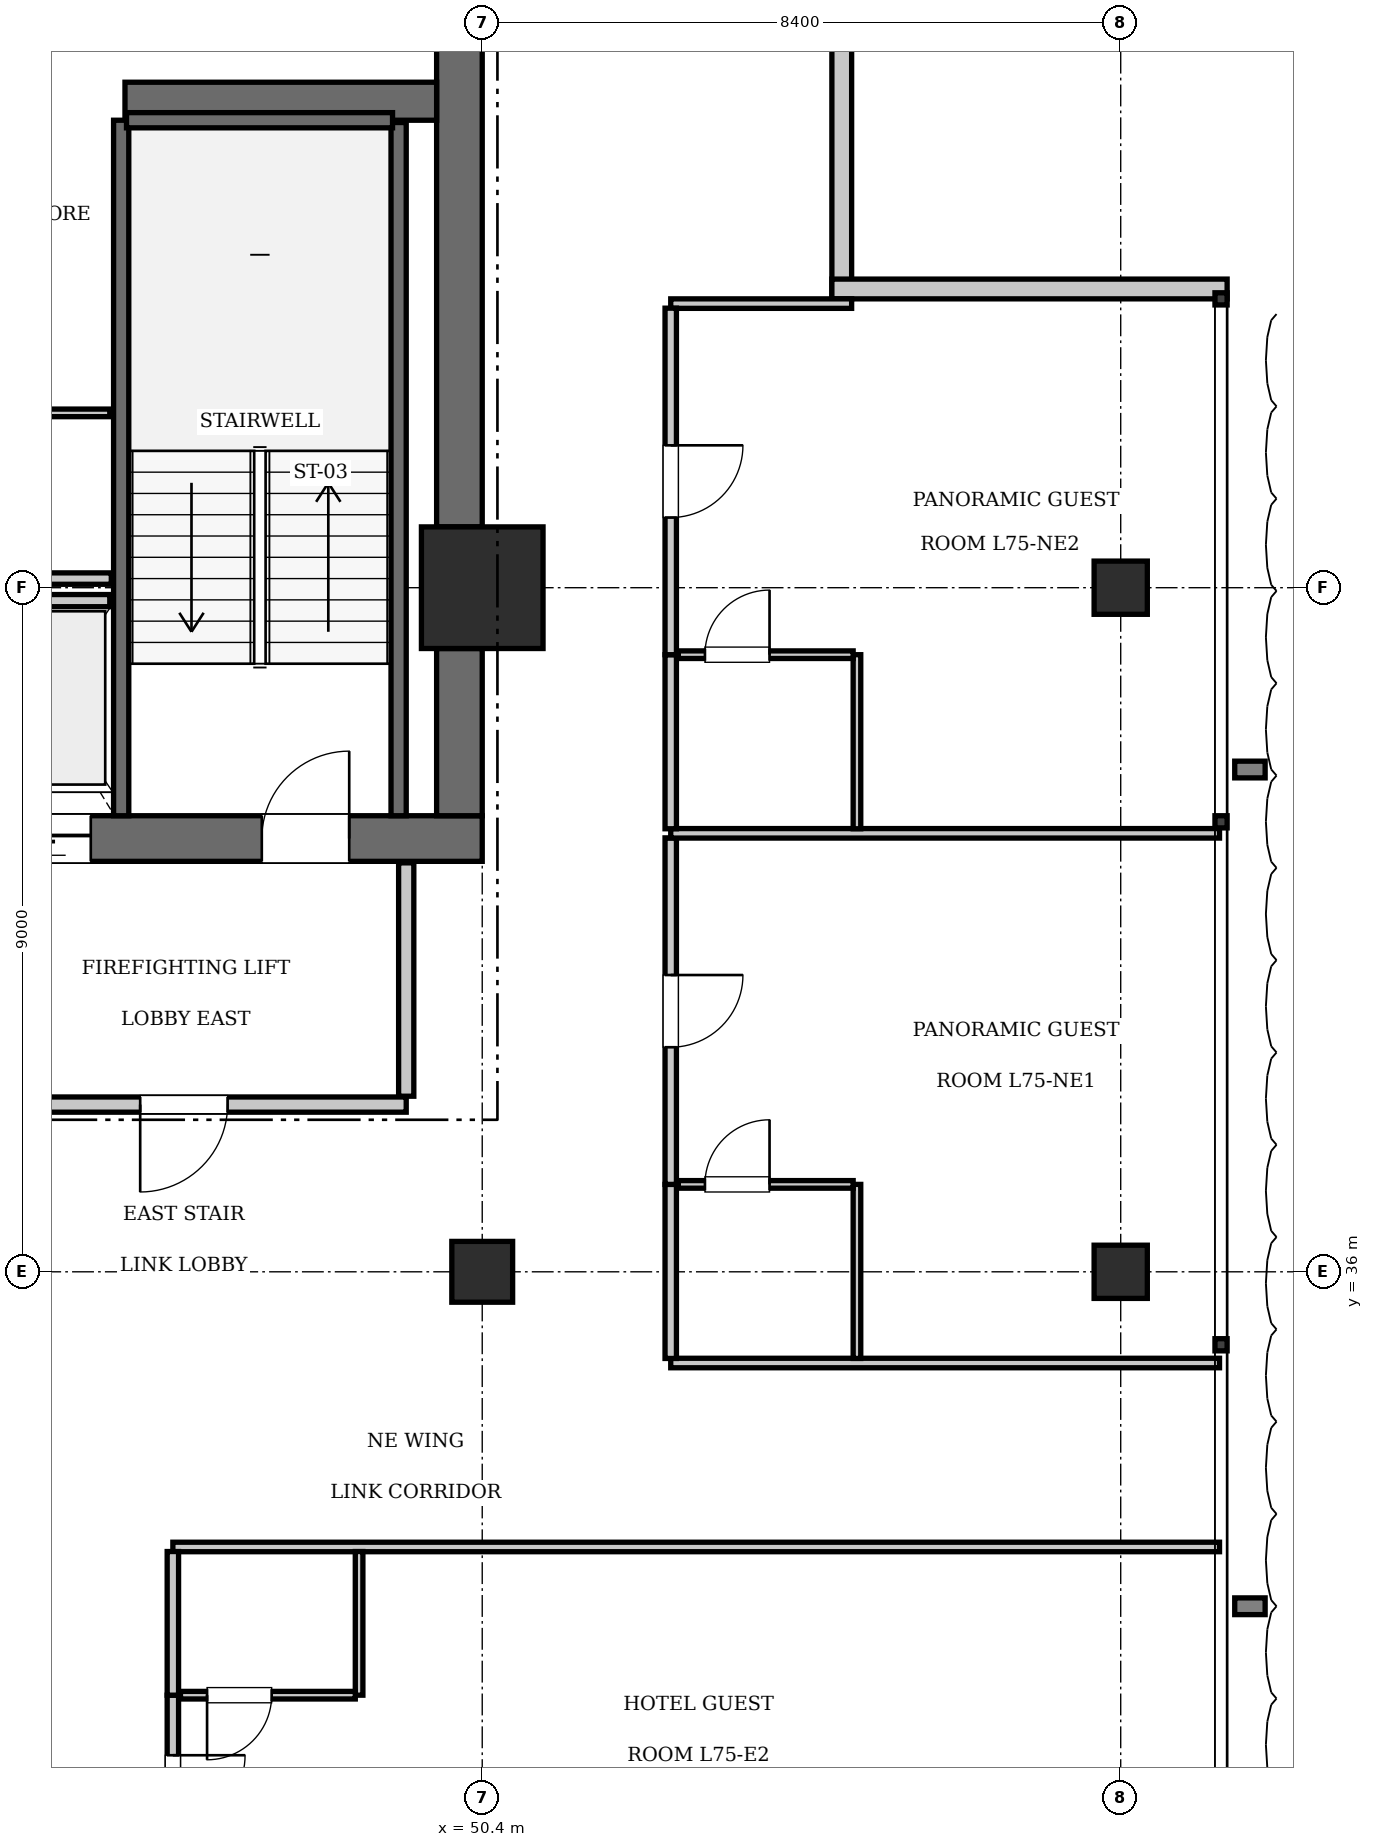
"""IFC4 building model, lengths in metres.
Left out: names, types, materials, properties, quantities, classifications, styles, units other than length and angle.
Written with IfcOpenShell. Run it as: python <this file> out.ifc"""

import sys

from ifc_helpers import new_model, si_unit, direction, frame, frame_2d, origin, origin_2d, place, context, subcontext, project, spatial, rectangle, extrude, element, fill, save


model = new_model("IFC4")
c1 = context("Model", 3, precision=1e-05, world=origin(), true_north=direction((0.0, 1.0)))
c2 = subcontext(c1, "Body", "Model", "MODEL_VIEW")
j1 = project(units=[si_unit("LENGTHUNIT", "METRE"), si_unit("PLANEANGLEUNIT", "RADIAN")], contexts=[c1])
p1 = place(None, origin())
s1 = spatial("IfcSite", under=j1, at=p1, CompositionType="ELEMENT")
p2 = place(p1, origin())
s2 = spatial("IfcBuilding", under=s1, at=p2, CompositionType="ELEMENT")
p3 = place(p2, frame((0.0, 0.0, 304.85)))
s3 = spatial("IfcBuildingStorey", under=s2, at=p3, CompositionType="ELEMENT", Elevation=304.85)
p4 = place(p3, frame((50.4, 45.0, 0.0), z_axis=(0.0, 0.0, 1.0), x_axis=(1.0, 0.0, 0.0)))
e1 = element("IfcColumn", 1, at=p4, inside=s3, PredefinedType="COLUMN", context=c2, shape_type="SweptSolid", body=[
    extrude(rectangle(XDim=1.6, YDim=1.6, at=origin_2d()), origin(), (0.0, 0.0, 1.0), 3.85),
])
p5 = place(p3, frame((43.6, 41.7, 0.0), z_axis=(0.0, 0.0, 1.0), x_axis=(1.0, 0.0, 0.0)))
e2 = element("IfcWall", 2, at=p5, inside=s3, PredefinedType="SHEAR", context=c2, shape_type="SweptSolid", body=[
    extrude(rectangle(XDim=6.8, YDim=0.6, at=frame_2d((3.4, 0.0))), origin(), (0.0, 0.0, 1.0), 3.85),
])
p6 = place(p5, frame((3.9, 0.0, 0.0)))
e3 = element("IfcOpeningElement", 3, at=p6, cuts=e2, PredefinedType="OPENING", context=c2, shape_type="SweptSolid", body=[
    extrude(rectangle(XDim=1.15, YDim=2.15, at=frame_2d((0.575, 1.075))), frame((0.0, 0.31, 0.0), z_axis=(0.0, -1.0, 0.0), x_axis=(1.0, 0.0, 0.0)), (0.0, 0.0, 1.0), 0.62),
])
p7 = place(p5, frame((0.55, 0.0, 0.0)))
e4 = element("IfcOpeningElement", 4, at=p7, cuts=e2, PredefinedType="OPENING", context=c2, shape_type="SweptSolid", body=[
    extrude(rectangle(XDim=1.1, YDim=2.2, at=frame_2d((0.55, 1.1))), frame((0.0, 0.31, 0.0), z_axis=(0.0, -1.0, 0.0), x_axis=(1.0, 0.0, 0.0)), (0.0, 0.0, 1.0), 0.62),
])
p8 = place(p3, frame((50.1, 42.0, 0.0), z_axis=(0.0, 0.0, 1.0), x_axis=(0.0, 1.0, 0.0)))
e5 = element("IfcWall", 5, at=p8, inside=s3, PredefinedType="SHEAR", context=c2, shape_type="SweptSolid", body=[
    extrude(rectangle(XDim=2.2, YDim=0.6, at=frame_2d((1.1, 0.0))), origin(), (0.0, 0.0, 1.0), 3.85),
])
p9 = place(p3, frame((50.1, 45.8, 0.0), z_axis=(0.0, 0.0, 1.0), x_axis=(0.0, 1.0, 0.0)))
e6 = element("IfcWall", 6, at=p9, inside=s3, PredefinedType="SHEAR", context=c2, shape_type="SweptSolid", body=[
    extrude(rectangle(XDim=7.6, YDim=0.6, at=frame_2d((3.8, 0.0))), origin(), (0.0, 0.0, 1.0), 3.85),
])
p10 = place(p3, frame((45.7, 51.4, 0.0), z_axis=(0.0, 0.0, 1.0), x_axis=(1.0, 0.0, 0.0)))
e7 = element("IfcWall", 7, at=p10, inside=s3, PredefinedType="SHEAR", context=c2, shape_type="SweptSolid", body=[
    extrude(rectangle(XDim=4.1, YDim=0.5, at=frame_2d((2.05, 0.0))), origin(), (0.0, 0.0, 1.0), 3.85),
])
p11 = place(p3, frame((50.4, 36.0, 0.0), z_axis=(0.0, 0.0, 1.0), x_axis=(1.0, 0.0, 0.0)))
e8 = element("IfcColumn", 8, at=p11, inside=s3, PredefinedType="COLUMN", context=c2, shape_type="SweptSolid", body=[
    extrude(rectangle(XDim=0.8, YDim=0.8, at=origin_2d()), origin(), (0.0, 0.0, 1.0), 3.85),
])
for number, where, z_axis, x_axis in (
    (9, (58.8, 36.0, 0.0), (0.0, 0.0, 1.0), (1.0, 0.0, 0.0)),
    (10, (58.8, 45.0, 0.0), (0.0, 0.0, 1.0), (1.0, 0.0, 0.0)),
):
    element("IfcColumn", number, at=place(p3, frame(where, z_axis=z_axis, x_axis=x_axis)), inside=s3, PredefinedType="COLUMN", context=c2, shape_type="SweptSolid", body=[
        extrude(rectangle(XDim=0.7, YDim=0.7, at=origin_2d()), origin(), (0.0, 0.0, 1.0), 3.85),
    ])
p12 = place(p3, frame((45.65, 42.0, 0.0), z_axis=(0.0, 0.0, 1.0), x_axis=(0.0, 1.0, 0.0)))
e11 = element("IfcWall", 11, at=p12, inside=s3, PredefinedType="SOLIDWALL", context=c2, shape_type="SweptSolid", body=[
    extrude(rectangle(XDim=9.15, YDim=0.2, at=frame_2d((4.575, 0.0))), origin(), (0.0, 0.0, 1.0), 3.61),
])
p13 = place(p3, frame((49.3, 42.0, 0.0), z_axis=(0.0, 0.0, 1.0), x_axis=(0.0, 1.0, 0.0)))
e12 = element("IfcWall", 12, at=p13, inside=s3, PredefinedType="SOLIDWALL", context=c2, shape_type="SweptSolid", body=[
    extrude(rectangle(XDim=9.12, YDim=0.2, at=frame_2d((4.56, 0.0))), origin(), (0.0, 0.0, 1.0), 3.61),
])
p14 = place(p3, frame((45.72, 51.15, 0.0), z_axis=(0.0, 0.0, 1.0), x_axis=(1.0, 0.0, 0.0)))
e13 = element("IfcWall", 13, at=p14, inside=s3, PredefinedType="SOLIDWALL", context=c2, shape_type="SweptSolid", body=[
    extrude(rectangle(XDim=3.5, YDim=0.2, at=frame_2d((1.75, 0.0))), origin(), (0.0, 0.0, 1.0), 3.61),
])
p15 = place(p3, frame((43.9, 44.83, 0.0), z_axis=(0.0, 0.0, 1.0), x_axis=(1.0, 0.0, 0.0)))
e14 = element("IfcWall", 14, at=p15, inside=s3, PredefinedType="SOLIDWALL", context=c2, shape_type="SweptSolid", body=[
    extrude(rectangle(XDim=1.6, YDim=0.16, at=frame_2d((0.8, 0.0))), origin(), (0.0, 0.0, 1.0), 3.61),
])
for number, where, z_axis, x_axis in (
    (15, (55.13, 54.0, 0.0), (0.0, 0.0, 1.0), (0.0, -1.0, 0.0)),
    (16, (55.0, 48.93, 0.0), (0.0, 0.0, 1.0), (1.0, 0.0, 0.0)),
):
    element("IfcWall", number, at=place(p3, frame(where, z_axis=z_axis, x_axis=x_axis)), inside=s3, PredefinedType="SOLIDWALL", context=c2, shape_type="SweptSolid", body=[
        extrude(rectangle(XDim=5.2, YDim=0.26, at=frame_2d((2.6, 0.0))), origin(), (0.0, 0.0, 1.0), 3.61),
    ])
p16 = place(p3, frame((43.6, 38.2, 0.0), z_axis=(0.0, 0.0, 1.0), x_axis=(1.0, 0.0, 0.0)))
e17 = element("IfcWall", 17, at=p16, inside=s3, PredefinedType="PARTITIONING", context=c2, shape_type="SweptSolid", body=[
    extrude(rectangle(XDim=5.8, YDim=0.2, at=frame_2d((2.9, 0.0))), origin(), (0.0, 0.0, 1.0), 3.61),
])
p17 = place(p16, frame((2.3, 0.0, 0.0)))
e18 = element("IfcOpeningElement", 18, at=p17, cuts=e17, PredefinedType="OPENING", context=c2, shape_type="SweptSolid", body=[
    extrude(rectangle(XDim=1.15, YDim=2.15, at=frame_2d((0.575, 1.075))), frame((0.0, 0.11, 0.0), z_axis=(0.0, -1.0, 0.0), x_axis=(1.0, 0.0, 0.0)), (0.0, 0.0, 1.0), 0.22),
])
p18 = place(p3, frame((49.4, 38.31, 0.0), z_axis=(0.0, 0.0, 1.0), x_axis=(0.0, 1.0, 0.0)))
e19 = element("IfcWall", 19, at=p18, inside=s3, PredefinedType="PARTITIONING", context=c2, shape_type="SweptSolid", body=[
    extrude(rectangle(XDim=3.07, YDim=0.2, at=frame_2d((1.535, 0.0))), origin(), (0.0, 0.0, 1.0), 3.61),
])
p19 = place(p3, frame((42.4, 47.3, 0.0), z_axis=(0.0, 0.0, 1.0), x_axis=(1.0, 0.0, 0.0)))
e20 = element("IfcWall", 20, at=p19, inside=s3, PredefinedType="PARTITIONING", context=c2, shape_type="SweptSolid", body=[
    extrude(rectangle(XDim=3.1, YDim=0.1, at=frame_2d((1.55, 0.0))), origin(), (0.0, 0.0, 1.0), 3.61),
])
p20 = place(p3, frame((42.38, 45.12, 0.0), z_axis=(0.0, 0.0, 1.0), x_axis=(1.0, 0.0, 0.0)))
e21 = element("IfcWall", 21, at=p20, inside=s3, PredefinedType="PARTITIONING", context=c2, shape_type="SweptSolid", body=[
    extrude(rectangle(XDim=3.14, YDim=0.15, at=frame_2d((1.57, 0.0))), origin(), (0.0, 0.0, 1.0), 3.61),
])
p21 = place(p3, frame((46.33, 32.38, 0.0), z_axis=(0.0, 0.0, 1.0), x_axis=(1.0, 0.0, 0.0)))
e22 = element("IfcWall", 22, at=p21, inside=s3, PredefinedType="PARTITIONING", context=c2, shape_type="SweptSolid", body=[
    extrude(rectangle(XDim=13.77, YDim=0.125, at=frame_2d((6.885, 0.0))), origin(), (0.0, 0.0, 1.0), 3.61),
])
p22 = place(p3, frame((46.33, 27.9, 0.0), z_axis=(0.0, 0.0, 1.0), x_axis=(0.0, 1.0, 0.0)))
e23 = element("IfcWall", 23, at=p22, inside=s3, PredefinedType="PARTITIONING", context=c2, shape_type="SweptSolid", body=[
    extrude(rectangle(XDim=2.53, YDim=0.15, at=frame_2d((1.265, 0.0))), origin(), (0.0, 0.0, 1.0), 3.61),
])
p23 = place(p22, frame((0.79, 0.0, 0.0)))
e24 = element("IfcOpeningElement", 24, at=p23, cuts=e23, PredefinedType="OPENING", context=c2, shape_type="SweptSolid", body=[
    extrude(rectangle(XDim=0.95, YDim=2.15, at=frame_2d((0.475, 1.075))), frame((0.0, 0.085, 0.0), z_axis=(0.0, -1.0, 0.0), x_axis=(1.0, 0.0, 0.0)), (0.0, 0.0, 1.0), 0.17),
])
p24 = place(p3, frame((46.33, 30.43, 0.0), z_axis=(0.0, 0.0, 1.0), x_axis=(0.0, 1.0, 0.0)))
e25 = element("IfcWall", 25, at=p24, inside=s3, PredefinedType="PARTITIONING", context=c2, shape_type="SweptSolid", body=[
    extrude(rectangle(XDim=1.89, YDim=0.15, at=frame_2d((0.945, 0.0))), origin(), (0.0, 0.0, 1.0), 3.61),
])
p25 = place(p3, frame((48.78, 30.43, 0.0), z_axis=(0.0, 0.0, 1.0), x_axis=(0.0, 1.0, 0.0)))
e26 = element("IfcWall", 26, at=p25, inside=s3, PredefinedType="PARTITIONING", context=c2, shape_type="SweptSolid", body=[
    extrude(rectangle(XDim=1.89, YDim=0.1, at=frame_2d((0.945, 0.0))), origin(), (0.0, 0.0, 1.0), 3.61),
])
p26 = place(p3, frame((46.43, 30.43, 0.0), z_axis=(0.0, 0.0, 1.0), x_axis=(1.0, 0.0, 0.0)))
e27 = element("IfcWall", 27, at=p26, inside=s3, PredefinedType="PARTITIONING", context=c2, shape_type="SweptSolid", body=[
    extrude(rectangle(XDim=2.3, YDim=0.1, at=frame_2d((1.15, 0.0))), origin(), (0.0, 0.0, 1.0), 3.61),
])
p27 = place(p26, frame((0.35, 0.0, 0.0)))
e28 = element("IfcOpeningElement", 28, at=p27, cuts=e27, PredefinedType="OPENING", context=c2, shape_type="SweptSolid", body=[
    extrude(rectangle(XDim=0.85, YDim=2.1, at=frame_2d((0.425, 1.05))), frame((0.0, 0.06, 0.0), z_axis=(0.0, -1.0, 0.0), x_axis=(1.0, 0.0, 0.0)), (0.0, 0.0, 1.0), 0.12),
])
p28 = place(p3, frame((52.88, 34.8, 0.0), z_axis=(0.0, 0.0, 1.0), x_axis=(1.0, 0.0, 0.0)))
e29 = element("IfcWall", 29, at=p28, inside=s3, PredefinedType="PARTITIONING", context=c2, shape_type="SweptSolid", body=[
    extrude(rectangle(XDim=7.22, YDim=0.125, at=frame_2d((3.61, 0.0))), origin(), (0.0, 0.0, 1.0), 3.61),
])
p29 = place(p3, frame((52.88, 48.738, 0.0), z_axis=(0.0, 0.0, 1.0), x_axis=(1.0, 0.0, 0.0)))
e30 = element("IfcWall", 30, at=p29, inside=s3, PredefinedType="PARTITIONING", context=c2, shape_type="SweptSolid", body=[
    extrude(rectangle(XDim=2.38, YDim=0.125, at=frame_2d((1.19, 0.0))), origin(), (0.0, 0.0, 1.0), 3.61),
])
p30 = place(p3, frame((52.88, 34.86, 0.0), z_axis=(0.0, 0.0, 1.0), x_axis=(0.0, 1.0, 0.0)))
e31 = element("IfcWall", 31, at=p30, inside=s3, PredefinedType="PARTITIONING", context=c2, shape_type="SweptSolid", body=[
    extrude(rectangle(XDim=2.29, YDim=0.15, at=frame_2d((1.145, 0.0))), origin(), (0.0, 0.0, 1.0), 3.61),
])
p31 = place(p3, frame((52.88, 37.15, 0.0), z_axis=(0.0, 0.0, 1.0), x_axis=(0.0, 1.0, 0.0)))
e32 = element("IfcWall", 32, at=p31, inside=s3, PredefinedType="PARTITIONING", context=c2, shape_type="SweptSolid", body=[
    extrude(rectangle(XDim=4.559, YDim=0.15, at=frame_2d((2.279, 0.0))), origin(), (0.0, 0.0, 1.0), 3.61),
])
p32 = place(p31, frame((1.804, 0.0, 0.0)))
e33 = element("IfcOpeningElement", 33, at=p32, cuts=e32, PredefinedType="OPENING", context=c2, shape_type="SweptSolid", body=[
    extrude(rectangle(XDim=0.95, YDim=2.15, at=frame_2d((0.475, 1.075))), frame((0.0, 0.085, 0.0), z_axis=(0.0, -1.0, 0.0), x_axis=(1.0, 0.0, 0.0)), (0.0, 0.0, 1.0), 0.17),
])
p33 = place(p3, frame((55.33, 34.86, 0.0), z_axis=(0.0, 0.0, 1.0), x_axis=(0.0, 1.0, 0.0)))
e34 = element("IfcWall", 34, at=p33, inside=s3, PredefinedType="PARTITIONING", context=c2, shape_type="SweptSolid", body=[
    extrude(rectangle(XDim=2.29, YDim=0.1, at=frame_2d((1.145, 0.0))), origin(), (0.0, 0.0, 1.0), 3.61),
])
p34 = place(p3, frame((52.98, 37.15, 0.0), z_axis=(0.0, 0.0, 1.0), x_axis=(1.0, 0.0, 0.0)))
e35 = element("IfcWall", 35, at=p34, inside=s3, PredefinedType="PARTITIONING", context=c2, shape_type="SweptSolid", body=[
    extrude(rectangle(XDim=2.3, YDim=0.1, at=frame_2d((1.15, 0.0))), origin(), (0.0, 0.0, 1.0), 3.61),
])
p35 = place(p34, frame((0.35, 0.0, 0.0)))
e36 = element("IfcOpeningElement", 36, at=p35, cuts=e35, PredefinedType="OPENING", context=c2, shape_type="SweptSolid", body=[
    extrude(rectangle(XDim=0.85, YDim=2.1, at=frame_2d((0.425, 1.05))), frame((0.0, 0.06, 0.0), z_axis=(0.0, -1.0, 0.0), x_axis=(1.0, 0.0, 0.0)), (0.0, 0.0, 1.0), 0.12),
])
p36 = place(p3, frame((52.88, 41.769, 0.0), z_axis=(0.0, 0.0, 1.0), x_axis=(1.0, 0.0, 0.0)))
e37 = element("IfcWall", 37, at=p36, inside=s3, PredefinedType="PARTITIONING", context=c2, shape_type="SweptSolid", body=[
    extrude(rectangle(XDim=7.22, YDim=0.125, at=frame_2d((3.61, 0.0))), origin(), (0.0, 0.0, 1.0), 3.61),
])
p37 = place(p3, frame((52.88, 41.829, 0.0), z_axis=(0.0, 0.0, 1.0), x_axis=(0.0, 1.0, 0.0)))
e38 = element("IfcWall", 38, at=p37, inside=s3, PredefinedType="PARTITIONING", context=c2, shape_type="SweptSolid", body=[
    extrude(rectangle(XDim=2.29, YDim=0.15, at=frame_2d((1.145, 0.0))), origin(), (0.0, 0.0, 1.0), 3.61),
])
p38 = place(p3, frame((52.88, 44.119, 0.0), z_axis=(0.0, 0.0, 1.0), x_axis=(0.0, 1.0, 0.0)))
e39 = element("IfcWall", 39, at=p38, inside=s3, PredefinedType="PARTITIONING", context=c2, shape_type="SweptSolid", body=[
    extrude(rectangle(XDim=4.559, YDim=0.15, at=frame_2d((2.279, 0.0))), origin(), (0.0, 0.0, 1.0), 3.61),
])
p39 = place(p38, frame((1.804, 0.0, 0.0)))
e40 = element("IfcOpeningElement", 40, at=p39, cuts=e39, PredefinedType="OPENING", context=c2, shape_type="SweptSolid", body=[
    extrude(rectangle(XDim=0.95, YDim=2.15, at=frame_2d((0.475, 1.075))), frame((0.0, 0.085, 0.0), z_axis=(0.0, -1.0, 0.0), x_axis=(1.0, 0.0, 0.0)), (0.0, 0.0, 1.0), 0.17),
])
p40 = place(p3, frame((55.33, 41.829, 0.0), z_axis=(0.0, 0.0, 1.0), x_axis=(0.0, 1.0, 0.0)))
e41 = element("IfcWall", 41, at=p40, inside=s3, PredefinedType="PARTITIONING", context=c2, shape_type="SweptSolid", body=[
    extrude(rectangle(XDim=2.29, YDim=0.1, at=frame_2d((1.145, 0.0))), origin(), (0.0, 0.0, 1.0), 3.61),
])
p41 = place(p3, frame((52.98, 44.119, 0.0), z_axis=(0.0, 0.0, 1.0), x_axis=(1.0, 0.0, 0.0)))
e42 = element("IfcWall", 42, at=p41, inside=s3, PredefinedType="PARTITIONING", context=c2, shape_type="SweptSolid", body=[
    extrude(rectangle(XDim=2.3, YDim=0.1, at=frame_2d((1.15, 0.0))), origin(), (0.0, 0.0, 1.0), 3.61),
])
p42 = place(p41, frame((0.35, 0.0, 0.0)))
e43 = element("IfcOpeningElement", 43, at=p42, cuts=e42, PredefinedType="OPENING", context=c2, shape_type="SweptSolid", body=[
    extrude(rectangle(XDim=0.85, YDim=2.1, at=frame_2d((0.425, 1.05))), frame((0.0, 0.06, 0.0), z_axis=(0.0, -1.0, 0.0), x_axis=(1.0, 0.0, 0.0)), (0.0, 0.0, 1.0), 0.12),
])
p43 = place(p6, origin())
e44 = element("IfcDoor", 44, at=p43, inside=s3, OperationType="SINGLE_SWING_RIGHT", PredefinedType="DOOR", context=c2, shape_type="SweptSolid", body=[
    extrude(rectangle(XDim=1.15, YDim=2.15, at=frame_2d((0.575, 1.075))), frame((0.0, 0.025, 0.0), z_axis=(0.0, -1.0, 0.0), x_axis=(1.0, 0.0, 0.0)), (0.0, 0.0, 1.0), 0.05),
])
fill(e3, e44)
p44 = place(p7, frame((1.1, 0.0, 0.0), z_axis=(0.0, 0.0, 1.0), x_axis=(-1.0, 0.0, 0.0)))
e45 = element("IfcDoor", 45, at=p44, inside=s3, OperationType="SLIDING_TO_LEFT", PredefinedType="DOOR", context=c2, shape_type="SweptSolid", body=[
    extrude(rectangle(XDim=1.1, YDim=2.2, at=frame_2d((0.55, 1.1))), frame((0.0, 0.025, 0.0), z_axis=(0.0, -1.0, 0.0), x_axis=(1.0, 0.0, 0.0)), (0.0, 0.0, 1.0), 0.05),
])
fill(e4, e45)
p45 = place(p17, frame((1.15, 0.0, 0.0), z_axis=(0.0, 0.0, 1.0), x_axis=(-1.0, 0.0, 0.0)))
e46 = element("IfcDoor", 46, at=p45, inside=s3, OperationType="SINGLE_SWING_RIGHT", PredefinedType="DOOR", context=c2, shape_type="SweptSolid", body=[
    extrude(rectangle(XDim=1.15, YDim=2.15, at=frame_2d((0.575, 1.075))), frame((0.0, 0.025, 0.0), z_axis=(0.0, -1.0, 0.0), x_axis=(1.0, 0.0, 0.0)), (0.0, 0.0, 1.0), 0.05),
])
fill(e18, e46)
p46 = place(p27, frame((0.85, 0.0, 0.0), z_axis=(0.0, 0.0, 1.0), x_axis=(-1.0, 0.0, 0.0)))
e47 = element("IfcDoor", 47, at=p46, inside=s3, OperationType="SINGLE_SWING_RIGHT", PredefinedType="DOOR", context=c2, shape_type="SweptSolid", body=[
    extrude(rectangle(XDim=0.85, YDim=2.1, at=frame_2d((0.425, 1.05))), frame((0.0, 0.025, 0.0), z_axis=(0.0, -1.0, 0.0), x_axis=(1.0, 0.0, 0.0)), (0.0, 0.0, 1.0), 0.05),
])
fill(e28, e47)
p47 = place(p23, frame((0.95, 0.0, 0.0), z_axis=(0.0, 0.0, 1.0), x_axis=(-1.0, 0.0, 0.0)))
e48 = element("IfcDoor", 48, at=p47, inside=s3, OperationType="SINGLE_SWING_LEFT", PredefinedType="DOOR", context=c2, shape_type="SweptSolid", body=[
    extrude(rectangle(XDim=0.95, YDim=2.15, at=frame_2d((0.475, 1.075))), frame((0.0, 0.025, 0.0), z_axis=(0.0, -1.0, 0.0), x_axis=(1.0, 0.0, 0.0)), (0.0, 0.0, 1.0), 0.05),
])
fill(e24, e48)
p48 = place(p35, origin())
e49 = element("IfcDoor", 49, at=p48, inside=s3, OperationType="SINGLE_SWING_RIGHT", PredefinedType="DOOR", context=c2, shape_type="SweptSolid", body=[
    extrude(rectangle(XDim=0.85, YDim=2.1, at=frame_2d((0.425, 1.05))), frame((0.0, 0.025, 0.0), z_axis=(0.0, -1.0, 0.0), x_axis=(1.0, 0.0, 0.0)), (0.0, 0.0, 1.0), 0.05),
])
fill(e36, e49)
p49 = place(p32, frame((0.95, 0.0, 0.0), z_axis=(0.0, 0.0, 1.0), x_axis=(-1.0, 0.0, 0.0)))
e50 = element("IfcDoor", 50, at=p49, inside=s3, OperationType="SINGLE_SWING_LEFT", PredefinedType="DOOR", context=c2, shape_type="SweptSolid", body=[
    extrude(rectangle(XDim=0.95, YDim=2.15, at=frame_2d((0.475, 1.075))), frame((0.0, 0.025, 0.0), z_axis=(0.0, -1.0, 0.0), x_axis=(1.0, 0.0, 0.0)), (0.0, 0.0, 1.0), 0.05),
])
fill(e33, e50)
p50 = place(p42, origin())
e51 = element("IfcDoor", 51, at=p50, inside=s3, OperationType="SINGLE_SWING_RIGHT", PredefinedType="DOOR", context=c2, shape_type="SweptSolid", body=[
    extrude(rectangle(XDim=0.85, YDim=2.1, at=frame_2d((0.425, 1.05))), frame((0.0, 0.025, 0.0), z_axis=(0.0, -1.0, 0.0), x_axis=(1.0, 0.0, 0.0)), (0.0, 0.0, 1.0), 0.05),
])
fill(e43, e51)
p51 = place(p39, frame((0.95, 0.0, 0.0), z_axis=(0.0, 0.0, 1.0), x_axis=(-1.0, 0.0, 0.0)))
e52 = element("IfcDoor", 52, at=p51, inside=s3, OperationType="SINGLE_SWING_LEFT", PredefinedType="DOOR", context=c2, shape_type="SweptSolid", body=[
    extrude(rectangle(XDim=0.95, YDim=2.15, at=frame_2d((0.475, 1.075))), frame((0.0, 0.025, 0.0), z_axis=(0.0, -1.0, 0.0), x_axis=(1.0, 0.0, 0.0)), (0.0, 0.0, 1.0), 0.05),
])
fill(e40, e52)
save(model, sys.argv[1])
